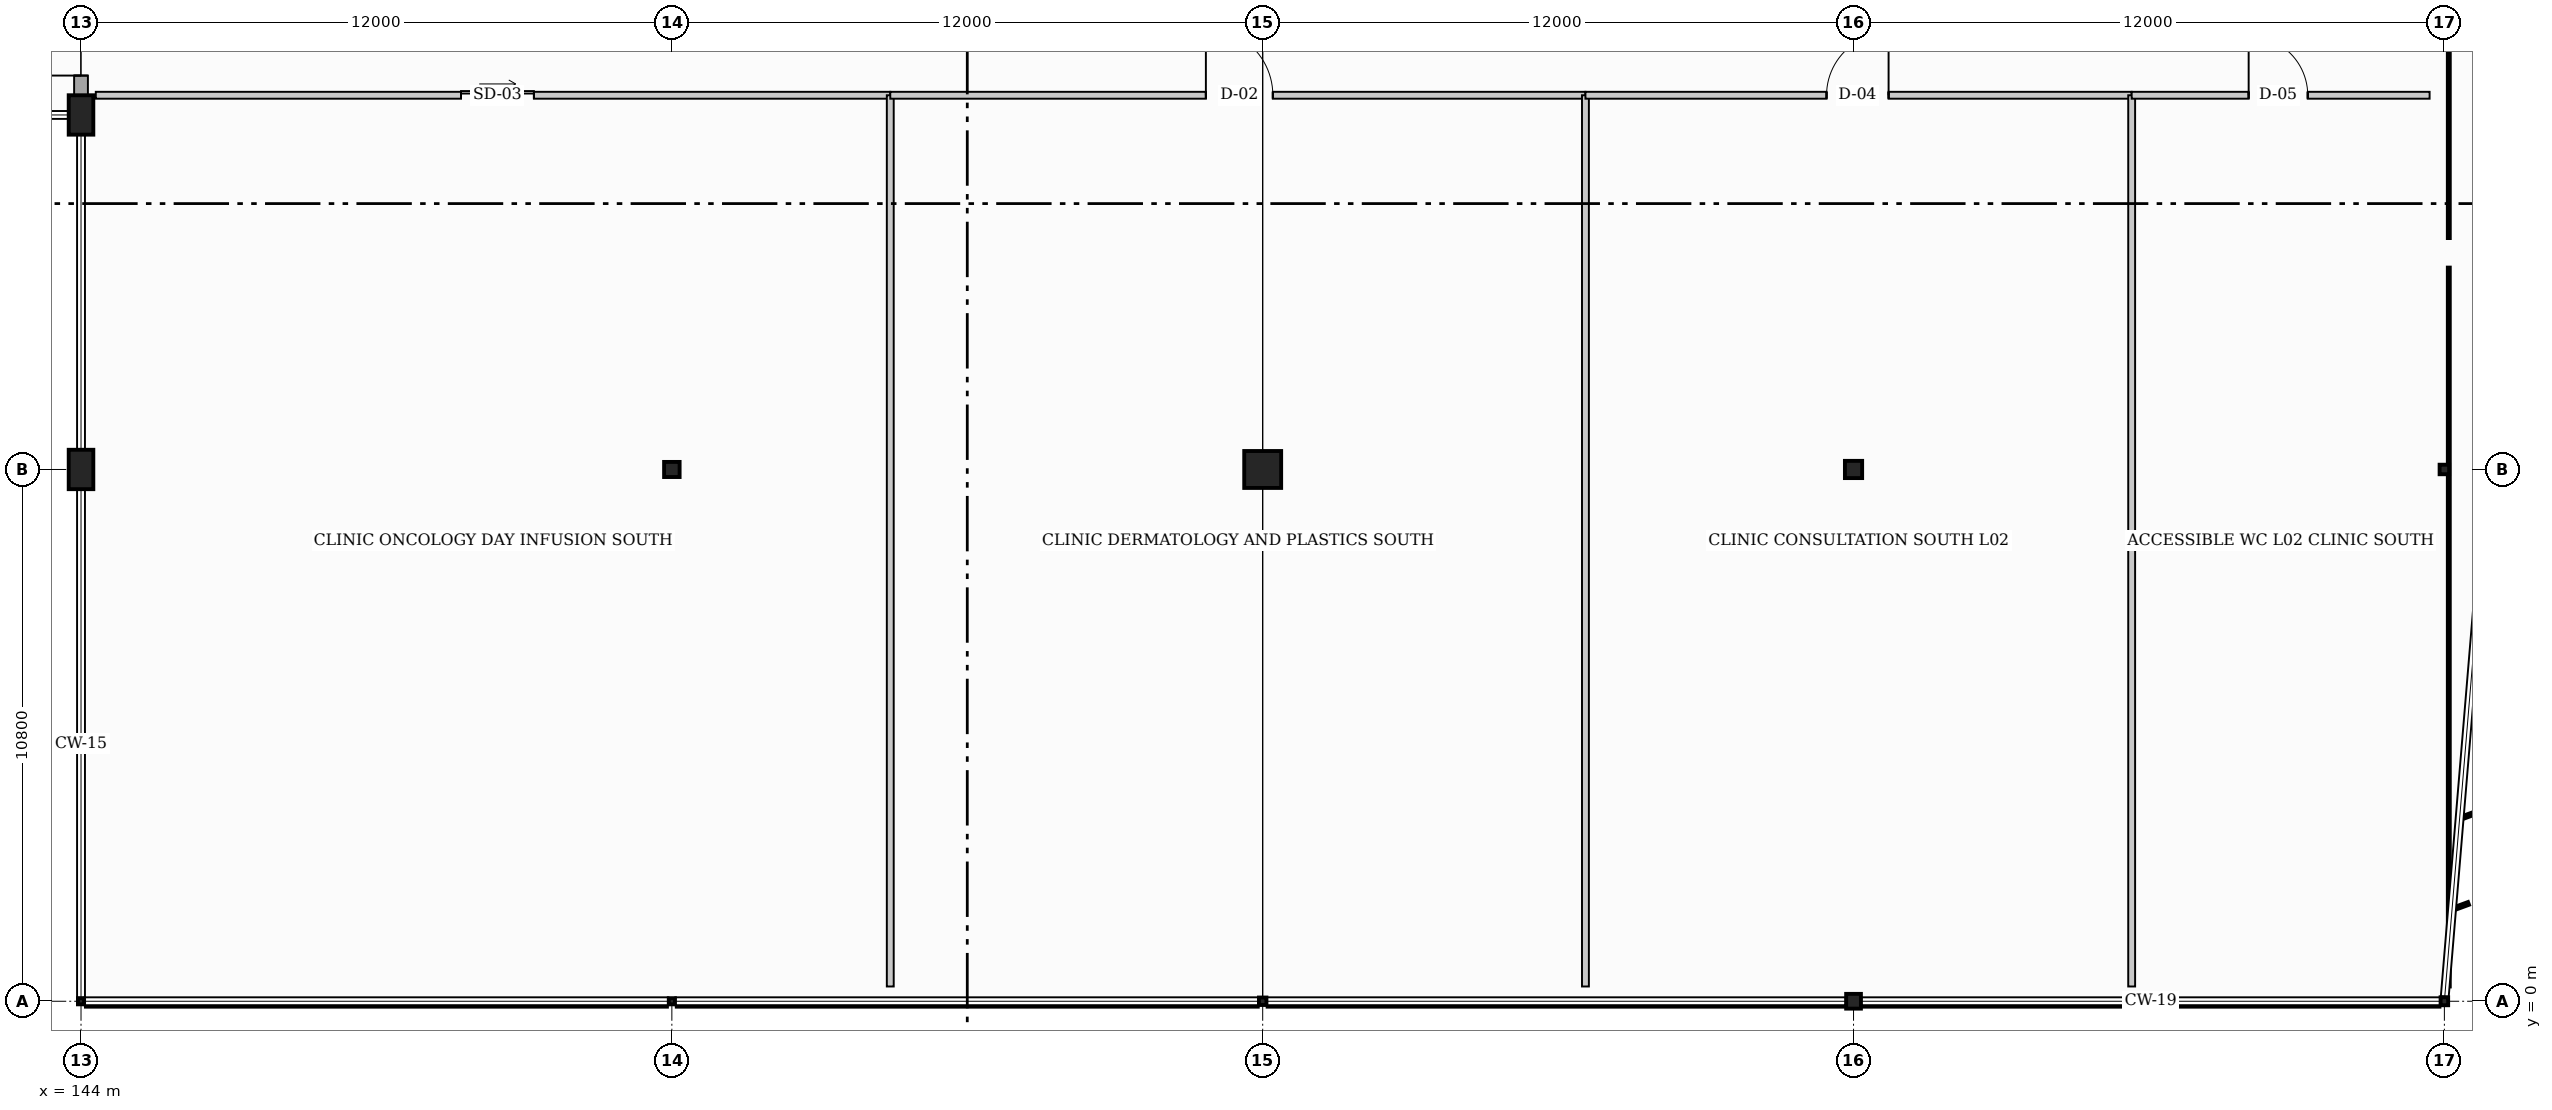
"""IFC4 building model, lengths in metres.
Left out: names, types, materials, properties, quantities, classifications, styles, units other than length and angle.
Written with IfcOpenShell. Run it as: python <this file> out.ifc"""

import sys

from ifc_helpers import new_model, si_unit, direction, frame, frame_2d, origin, origin_2d, place, context, subcontext, project, spatial, rectangle, hollow_rectangle, hollow_circle, i_section, extrude, element, fill, save


model = new_model("IFC4")
c1 = context("Model", 3, precision=1e-05, world=origin(), true_north=direction((0.0, 1.0)))
c2 = subcontext(c1, "Body", "Model", "MODEL_VIEW")
j1 = project(units=[si_unit("LENGTHUNIT", "METRE"), si_unit("PLANEANGLEUNIT", "RADIAN")], contexts=[c1])
p1 = place(None, origin())
s1 = spatial("IfcSite", under=j1, at=p1, CompositionType="ELEMENT")
p2 = place(p1, origin())
s2 = spatial("IfcBuilding", under=s1, at=p2, CompositionType="ELEMENT")
p3 = place(p2, frame((0.0, 0.0, 9.6)))
s3 = spatial("IfcBuildingStorey", under=s2, at=p3, CompositionType="ELEMENT", Elevation=9.6)
p4 = place(p3, frame((144.0, 0.0, 0.0), z_axis=(0.0, 0.0, 1.0), x_axis=(1.0, 0.0, 0.0)))
e1 = element("IfcColumn", 1, at=p4, inside=s3, PredefinedType="COLUMN", context=c2, shape_type="SweptSolid", body=[
    extrude(hollow_rectangle(XDim=0.125, YDim=0.125, WallThickness=0.006, at=origin_2d()), origin(), (0.0, 0.0, 1.0), 4.8),
])
p5 = place(p3, frame((144.0, 10.8, 0.0), z_axis=(0.0, 0.0, 1.0), x_axis=(1.0, 0.0, 0.0)))
e2 = element("IfcColumn", 2, at=p5, inside=s3, PredefinedType="PILASTER", context=c2, shape_type="SweptSolid", body=[
    extrude(rectangle(XDim=0.5, YDim=0.8, at=origin_2d()), origin(), (0.0, 0.0, 1.0), 4.8),
])
p6 = place(p3, frame((156.0, 0.0, 0.0), z_axis=(0.0, 0.0, 1.0), x_axis=(0.0, 1.0, 0.0)))
e3 = element("IfcColumn", 3, at=p6, inside=s3, PredefinedType="COLUMN", context=c2, shape_type="SweptSolid", body=[
    extrude(hollow_rectangle(XDim=0.125, YDim=0.125, WallThickness=0.006, at=origin_2d()), origin(), (0.0, 0.0, 1.0), 4.8),
])
p7 = place(p3, frame((156.0, 10.8, 0.0), z_axis=(0.0, 0.0, 1.0), x_axis=(0.0, 1.0, 0.0)))
e4 = element("IfcColumn", 4, at=p7, inside=s3, PredefinedType="COLUMN", context=c2, shape_type="SweptSolid", body=[
    extrude(i_section(OverallWidth=0.307, OverallDepth=0.315, WebThickness=0.012, FlangeThickness=0.019, at=origin_2d()), origin(), (0.0, 0.0, 1.0), 4.8),
])
p8 = place(p3, frame((168.0, 0.0, 0.0), z_axis=(0.0, 0.0, 1.0), x_axis=(1.0, 0.0, 0.0)))
e5 = element("IfcColumn", 5, at=p8, inside=s3, PredefinedType="COLUMN", context=c2, shape_type="SweptSolid", body=[
    extrude(i_section(OverallWidth=0.152, OverallDepth=0.152, WebThickness=0.006, FlangeThickness=0.007, at=origin_2d()), origin(), (0.0, 0.0, 1.0), 4.8),
])
p9 = place(p3, frame((168.0, 10.8, 0.0), z_axis=(0.0, 0.0, 1.0), x_axis=(1.0, 0.0, 0.0)))
e6 = element("IfcColumn", 6, at=p9, inside=s3, PredefinedType="COLUMN", context=c2, shape_type="SweptSolid", body=[
    extrude(rectangle(XDim=0.75, YDim=0.75, at=origin_2d()), origin(), (0.0, 0.0, 1.0), 4.8),
])
p10 = place(p3, frame((180.0, 0.0, 0.0), z_axis=(0.0, 0.0, 1.0), x_axis=(0.0, 1.0, 0.0)))
e7 = element("IfcColumn", 7, at=p10, inside=s3, PredefinedType="COLUMN", context=c2, shape_type="SweptSolid", body=[
    extrude(hollow_rectangle(XDim=0.3, YDim=0.3, WallThickness=0.012, at=origin_2d()), origin(), (0.0, 0.0, 1.0), 4.8),
])
p11 = place(p3, frame((180.0, 10.8, 0.0), z_axis=(0.0, 0.0, 1.0), x_axis=(0.0, 1.0, 0.0)))
e8 = element("IfcColumn", 8, at=p11, inside=s3, PredefinedType="COLUMN", context=c2, shape_type="SweptSolid", body=[
    extrude(i_section(OverallWidth=0.35, OverallDepth=0.35, WebThickness=0.014, FlangeThickness=0.024, at=origin_2d()), origin(), (0.0, 0.0, 1.0), 4.8),
])
p12 = place(p3, frame((192.0, 0.0, 0.0), z_axis=(0.0, 0.0, 1.0), x_axis=(1.0, 0.0, 0.0)))
e9 = element("IfcColumn", 9, at=p12, inside=s3, PredefinedType="COLUMN", context=c2, shape_type="SweptSolid", body=[
    extrude(i_section(OverallWidth=0.154, OverallDepth=0.162, WebThickness=0.008, FlangeThickness=0.011, at=origin_2d()), origin(), (0.0, 0.0, 1.0), 4.8),
])
p13 = place(p3, frame((192.0, 10.8, 0.0), z_axis=(0.0, 0.0, 1.0), x_axis=(1.0, 0.0, 0.0)))
e10 = element("IfcColumn", 10, at=p13, inside=s3, PredefinedType="COLUMN", context=c2, shape_type="SweptSolid", body=[
    extrude(hollow_circle(Radius=0.097, WallThickness=0.008, at=origin_2d()), origin(), (0.0, 0.0, 1.0), 4.8),
])
p14 = place(p3, frame((144.0, 18.0, 0.0), z_axis=(0.0, 0.0, 1.0), x_axis=(1.0, 0.0, 0.0)))
e11 = element("IfcColumn", 11, at=p14, inside=s3, PredefinedType="PILASTER", context=c2, shape_type="SweptSolid", body=[
    extrude(rectangle(XDim=0.5, YDim=0.8, at=origin_2d()), origin(), (0.0, 0.0, 1.0), 4.8),
])
p15 = place(p3, frame((144.0, 18.0, 0.0), z_axis=(0.0, 0.0, 1.0), x_axis=(0.0, 1.0, 0.0)))
e12 = element("IfcWall", 12, at=p15, inside=s3, PredefinedType="STANDARD", context=c2, shape_type="SweptSolid", body=[
    extrude(rectangle(XDim=9.6, YDim=0.28, at=frame_2d((4.8, 0.0))), origin(), (0.0, 0.0, 1.0), 3.53),
])
p16 = place(p15, frame((0.8, 0.0, 0.0)))
e13 = element("IfcOpeningElement", 13, at=p16, cuts=e12, PredefinedType="OPENING", context=c2, shape_type="SweptSolid", body=[
    extrude(rectangle(XDim=2.1, YDim=2.25, at=frame_2d((1.05, 1.125))), frame((0.0, 0.15, 0.0), z_axis=(0.0, -1.0, 0.0), x_axis=(1.0, 0.0, 0.0)), (0.0, 0.0, 1.0), 0.3),
])
p17 = place(p3, frame((144.3, 18.4, 0.0), z_axis=(0.0, 0.0, 1.0), x_axis=(1.0, 0.0, 0.0)))
e14 = element("IfcWall", 14, at=p17, inside=s3, PredefinedType="PARTITIONING", context=c2, shape_type="SweptSolid", body=[
    extrude(rectangle(XDim=16.136, YDim=0.14, at=frame_2d((8.068, 0.0))), origin(), (0.0, 0.0, 1.0), 3.818),
])
p18 = place(p17, frame((7.418, 0.0, 0.0)))
e15 = element("IfcOpeningElement", 15, at=p18, cuts=e14, PredefinedType="OPENING", context=c2, shape_type="SweptSolid", body=[
    extrude(rectangle(XDim=1.48, YDim=2.26, at=frame_2d((0.74, 1.13))), frame((0.0, 0.08, 0.0), z_axis=(0.0, -1.0, 0.0), x_axis=(1.0, 0.0, 0.0)), (0.0, 0.0, 1.0), 0.16),
])
p19 = place(p3, frame((160.436, 0.3, 0.0), z_axis=(0.0, 0.0, 1.0), x_axis=(0.0, 1.0, 0.0)))
e16 = element("IfcWall", 16, at=p19, inside=s3, PredefinedType="PARTITIONING", context=c2, shape_type="SweptSolid", body=[
    extrude(rectangle(XDim=18.1, YDim=0.14, at=frame_2d((9.05, 0.0))), origin(), (0.0, 0.0, 1.0), 3.53),
])
p20 = place(p3, frame((160.436, 18.4, 0.0), z_axis=(0.0, 0.0, 1.0), x_axis=(1.0, 0.0, 0.0)))
e17 = element("IfcWall", 17, at=p20, inside=s3, PredefinedType="PARTITIONING", context=c2, shape_type="SweptSolid", body=[
    extrude(rectangle(XDim=14.119, YDim=0.14, at=frame_2d((7.06, 0.0))), origin(), (0.0, 0.0, 1.0), 3.828),
])
p21 = place(p20, frame((6.41, 0.0, 0.0)))
e18 = element("IfcOpeningElement", 18, at=p21, cuts=e17, PredefinedType="OPENING", context=c2, shape_type="SweptSolid", body=[
    extrude(rectangle(XDim=1.36, YDim=2.18, at=frame_2d((0.68, 1.09))), frame((0.0, 0.08, 0.0), z_axis=(0.0, -1.0, 0.0), x_axis=(1.0, 0.0, 0.0)), (0.0, 0.0, 1.0), 0.16),
])
p22 = place(p3, frame((174.555, 0.3, 0.0), z_axis=(0.0, 0.0, 1.0), x_axis=(0.0, 1.0, 0.0)))
e19 = element("IfcWall", 19, at=p22, inside=s3, PredefinedType="PARTITIONING", context=c2, shape_type="SweptSolid", body=[
    extrude(rectangle(XDim=18.1, YDim=0.14, at=frame_2d((9.05, 0.0))), origin(), (0.0, 0.0, 1.0), 3.733),
])
p23 = place(p3, frame((174.555, 18.4, 0.0), z_axis=(0.0, 0.0, 1.0), x_axis=(1.0, 0.0, 0.0)))
e20 = element("IfcWall", 20, at=p23, inside=s3, PredefinedType="PARTITIONING", context=c2, shape_type="SweptSolid", body=[
    extrude(rectangle(XDim=11.094, YDim=0.14, at=frame_2d((5.547, 0.0))), origin(), (0.0, 0.0, 1.0), 3.892),
])
p24 = place(p23, frame((4.897, 0.0, 0.0)))
e21 = element("IfcOpeningElement", 21, at=p24, cuts=e20, PredefinedType="OPENING", context=c2, shape_type="SweptSolid", body=[
    extrude(rectangle(XDim=1.26, YDim=2.14, at=frame_2d((0.63, 1.07))), frame((0.0, 0.08, 0.0), z_axis=(0.0, -1.0, 0.0), x_axis=(1.0, 0.0, 0.0)), (0.0, 0.0, 1.0), 0.16),
])
p25 = place(p3, frame((185.649, 0.3, 0.0), z_axis=(0.0, 0.0, 1.0), x_axis=(0.0, 1.0, 0.0)))
e22 = element("IfcWall", 22, at=p25, inside=s3, PredefinedType="PARTITIONING", context=c2, shape_type="SweptSolid", body=[
    extrude(rectangle(XDim=18.1, YDim=0.14, at=frame_2d((9.05, 0.0))), origin(), (0.0, 0.0, 1.0), 3.813),
])
p26 = place(p3, frame((185.649, 18.4, 0.0), z_axis=(0.0, 0.0, 1.0), x_axis=(1.0, 0.0, 0.0)))
e23 = element("IfcWall", 23, at=p26, inside=s3, PredefinedType="PARTITIONING", context=c2, shape_type="SweptSolid", body=[
    extrude(rectangle(XDim=6.051, YDim=0.14, at=frame_2d((3.025, 0.0))), origin(), (0.0, 0.0, 1.0), 4.022),
])
p27 = place(p26, frame((2.376, 0.0, 0.0)))
e24 = element("IfcOpeningElement", 24, at=p27, cuts=e23, PredefinedType="OPENING", context=c2, shape_type="SweptSolid", body=[
    extrude(rectangle(XDim=1.2, YDim=2.12, at=frame_2d((0.6, 1.06))), frame((0.0, 0.08, 0.0), z_axis=(0.0, -1.0, 0.0), x_axis=(1.0, 0.0, 0.0)), (0.0, 0.0, 1.0), 0.16),
])
p28 = place(p16, origin())
e25 = element("IfcDoor", 25, at=p28, inside=s3, OperationType="DOUBLE_DOOR_SINGLE_SWING", PredefinedType="DOOR", context=c2, shape_type="SweptSolid", body=[
    extrude(rectangle(XDim=2.1, YDim=2.25, at=frame_2d((1.05, 1.125))), frame((0.0, 0.025, 0.0), z_axis=(0.0, -1.0, 0.0), x_axis=(1.0, 0.0, 0.0)), (0.0, 0.0, 1.0), 0.05),
])
fill(e13, e25)
p29 = place(p18, origin())
e26 = element("IfcDoor", 26, at=p29, inside=s3, OperationType="SLIDING_TO_LEFT", PredefinedType="DOOR", context=c2, shape_type="SweptSolid", body=[
    extrude(rectangle(XDim=1.48, YDim=2.26, at=frame_2d((0.74, 1.13))), frame((0.0, 0.025, 0.0), z_axis=(0.0, -1.0, 0.0), x_axis=(1.0, 0.0, 0.0)), (0.0, 0.0, 1.0), 0.05),
])
fill(e15, e26)
p30 = place(p21, origin())
e27 = element("IfcDoor", 27, at=p30, inside=s3, OperationType="SINGLE_SWING_LEFT", PredefinedType="DOOR", context=c2, shape_type="SweptSolid", body=[
    extrude(rectangle(XDim=1.36, YDim=2.18, at=frame_2d((0.68, 1.09))), frame((0.0, 0.025, 0.0), z_axis=(0.0, -1.0, 0.0), x_axis=(1.0, 0.0, 0.0)), (0.0, 0.0, 1.0), 0.05),
])
fill(e18, e27)
p31 = place(p24, origin())
e28 = element("IfcDoor", 28, at=p31, inside=s3, OperationType="SINGLE_SWING_RIGHT", PredefinedType="DOOR", context=c2, shape_type="SweptSolid", body=[
    extrude(rectangle(XDim=1.26, YDim=2.14, at=frame_2d((0.63, 1.07))), frame((0.0, 0.025, 0.0), z_axis=(0.0, -1.0, 0.0), x_axis=(1.0, 0.0, 0.0)), (0.0, 0.0, 1.0), 0.05),
])
fill(e21, e28)
p32 = place(p27, origin())
e29 = element("IfcDoor", 29, at=p32, inside=s3, OperationType="SINGLE_SWING_LEFT", PredefinedType="DOOR", context=c2, shape_type="SweptSolid", body=[
    extrude(rectangle(XDim=1.2, YDim=2.12, at=frame_2d((0.6, 1.06))), frame((0.0, 0.025, 0.0), z_axis=(0.0, -1.0, 0.0), x_axis=(1.0, 0.0, 0.0)), (0.0, 0.0, 1.0), 0.05),
])
fill(e24, e29)
save(model, sys.argv[1])
